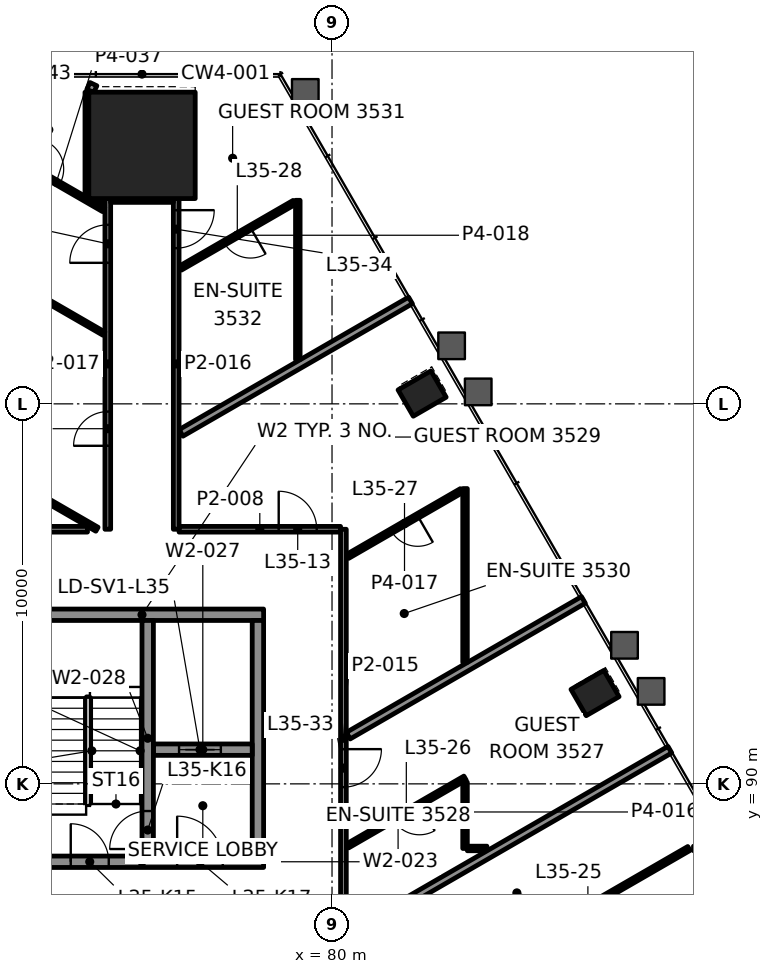
"""IFC4 building model, lengths in metres.
Left out: names, types, materials, properties, quantities, classifications, styles, units other than length and angle.
Written with IfcOpenShell. Run it as: python <this file> out.ifc"""

import sys

from ifc_helpers import new_model, si_unit, direction, frame, frame_2d, origin, origin_2d, place, context, subcontext, project, spatial, rectangle, hollow_rectangle, extrude, element, fill, save


model = new_model("IFC4")
c1 = context("Model", 3, precision=1e-05, world=origin(), true_north=direction((0.0, 1.0)))
c2 = subcontext(c1, "Body", "Model", "MODEL_VIEW")
j1 = project(units=[si_unit("LENGTHUNIT", "METRE"), si_unit("PLANEANGLEUNIT", "RADIAN")], contexts=[c1])
p1 = place(None, origin())
s1 = spatial("IfcSite", under=j1, at=p1, CompositionType="ELEMENT")
p2 = place(p1, origin())
s2 = spatial("IfcBuilding", under=s1, at=p2, CompositionType="ELEMENT")
p3 = place(p2, frame((0.0, 0.0, 155.8)))
s3 = spatial("IfcBuildingStorey", under=s2, at=p3, CompositionType="ELEMENT", Elevation=155.8)
p4 = place(p3, frame((75.0, 106.802, 0.0), z_axis=(0.0, 0.0, 1.0), x_axis=(-1.0, 0.0, 0.0)))
e1 = element("IfcColumn", 1, at=p4, inside=s3, PredefinedType="COLUMN", context=c2, shape_type="SweptSolid", body=[
    extrude(rectangle(XDim=2.8, YDim=2.8, at=origin_2d()), origin(), (0.0, 0.0, 1.0), 3.9),
])
for number, where, z_axis, x_axis in (
    (2, (86.921, 92.39, -0.0), (0.0, 0.0, 1.0), (-0.5, 0.866, 0.0)),
    (3, (82.371, 100.271, -0.0), (0.0, 0.0, 1.0), (-0.5, 0.866, 0.0)),
):
    element("IfcColumn", number, at=place(p3, frame(where, z_axis=z_axis, x_axis=x_axis)), inside=s3, PredefinedType="COLUMN", context=c2, shape_type="SweptSolid", body=[
        extrude(hollow_rectangle(XDim=0.8, YDim=1.0, WallThickness=0.05, at=origin_2d()), origin(), (0.0, 0.0, 1.0), 3.9),
    ])
p5 = place(p3, frame((71.8, 87.95, 0.0), z_axis=(0.0, 0.0, 1.0), x_axis=(1.0, 0.0, 0.0)))
e4 = element("IfcWall", 4, at=p5, inside=s3, PredefinedType="SHEAR", context=c2, shape_type="SweptSolid", body=[
    extrude(rectangle(XDim=6.4, YDim=0.3, at=frame_2d((3.2, 0.0))), origin(), (0.0, 0.0, 1.0), 3.7),
])
p6 = place(p5, frame((1.325, 0.0, 0.0)))
e5 = element("IfcOpeningElement", 5, at=p6, cuts=e4, PredefinedType="OPENING", context=c2, shape_type="SweptSolid", body=[
    extrude(rectangle(XDim=1.0, YDim=2.1, at=frame_2d((0.5, 1.05))), frame((0.0, 0.16, 0.0), z_axis=(0.0, -1.0, 0.0), x_axis=(1.0, 0.0, 0.0)), (0.0, 0.0, 1.0), 0.32),
])
p7 = place(p5, frame((4.125, 0.0, 0.0)))
e6 = element("IfcOpeningElement", 6, at=p7, cuts=e4, PredefinedType="OPENING", context=c2, shape_type="SweptSolid", body=[
    extrude(rectangle(XDim=1.2, YDim=2.1, at=frame_2d((0.6, 1.05))), frame((0.0, 0.16, 0.0), z_axis=(0.0, -1.0, 0.0), x_axis=(1.0, 0.0, 0.0)), (0.0, 0.0, 1.0), 0.32),
])
p8 = place(p3, frame((71.8, 94.45, 0.0), z_axis=(0.0, 0.0, 1.0), x_axis=(1.0, 0.0, 0.0)))
e7 = element("IfcWall", 7, at=p8, inside=s3, PredefinedType="SHEAR", context=c2, shape_type="SweptSolid", body=[
    extrude(rectangle(XDim=6.4, YDim=0.3, at=frame_2d((3.2, 0.0))), origin(), (0.0, 0.0, 1.0), 3.7),
])
p9 = place(p3, frame((78.05, 88.1, 0.0), z_axis=(0.0, 0.0, 1.0), x_axis=(0.0, 1.0, 0.0)))
e8 = element("IfcWall", 8, at=p9, inside=s3, PredefinedType="SHEAR", context=c2, shape_type="SweptSolid", body=[
    extrude(rectangle(XDim=6.2, YDim=0.3, at=frame_2d((3.1, 0.0))), origin(), (0.0, 0.0, 1.0), 3.7),
])
p10 = place(p3, frame((75.3, 90.9, 0.0), z_axis=(0.0, 0.0, 1.0), x_axis=(1.0, 0.0, 0.0)))
e9 = element("IfcWall", 9, at=p10, inside=s3, PredefinedType="SHEAR", context=c2, shape_type="SweptSolid", body=[
    extrude(rectangle(XDim=2.6, YDim=0.3, at=frame_2d((1.3, 0.0))), origin(), (0.0, 0.0, 1.0), 3.7),
])
p11 = place(p10, frame((0.675, 0.0, 0.0)))
e10 = element("IfcOpeningElement", 10, at=p11, cuts=e9, PredefinedType="OPENING", context=c2, shape_type="SweptSolid", body=[
    extrude(rectangle(XDim=1.1, YDim=2.1, at=frame_2d((0.55, 1.05))), frame((0.0, 0.16, 0.0), z_axis=(0.0, -1.0, 0.0), x_axis=(1.0, 0.0, 0.0)), (0.0, 0.0, 1.0), 0.32),
])
p12 = place(p3, frame((75.15, 88.1, 0.0), z_axis=(0.0, 0.0, 1.0), x_axis=(0.0, 1.0, 0.0)))
e11 = element("IfcWall", 11, at=p12, inside=s3, PredefinedType="SHEAR", context=c2, shape_type="SweptSolid", body=[
    extrude(rectangle(XDim=6.2, YDim=0.3, at=frame_2d((3.1, 0.0))), origin(), (0.0, 0.0, 1.0), 3.7),
])
p13 = place(p12, frame((0.185, 0.0, 0.0)))
e12 = element("IfcOpeningElement", 12, at=p13, cuts=e11, PredefinedType="OPENING", context=c2, shape_type="SweptSolid", body=[
    extrude(rectangle(XDim=1.0, YDim=2.1, at=frame_2d((0.5, 1.05))), frame((0.0, 0.16, 0.0), z_axis=(0.0, -1.0, 0.0), x_axis=(1.0, 0.0, 0.0)), (0.0, 0.0, 1.0), 0.32),
])
p14 = place(p3, frame((83.56, 88.3, 0.0), z_axis=(0.0, 0.0, 1.0), x_axis=(1.0, 0.0, 0.0)))
e13 = element("IfcWall", 13, at=p14, inside=s3, PredefinedType="PARTITIONING", context=c2, shape_type="SweptSolid", body=[
    extrude(rectangle(XDim=0.516, YDim=0.12, at=frame_2d((0.258, 0.0))), origin(), (0.0, 0.0, 1.0), 3.1),
])
p15 = place(p3, frame((69.775, 96.7, 0.0), z_axis=(0.0, 0.0, 1.0), x_axis=(1.0, 0.0, 0.0)))
e14 = element("IfcWall", 14, at=p15, inside=s3, PredefinedType="PARTITIONING", context=c2, shape_type="SweptSolid", body=[
    extrude(rectangle(XDim=3.79, YDim=0.15, at=frame_2d((1.895, 0.0))), origin(), (0.0, 0.0, 1.0), 3.1),
])
p16 = place(p3, frame((75.975, 96.7, 0.0), z_axis=(0.0, 0.0, 1.0), x_axis=(1.0, 0.0, 0.0)))
e15 = element("IfcWall", 15, at=p16, inside=s3, PredefinedType="PARTITIONING", context=c2, shape_type="SweptSolid", body=[
    extrude(rectangle(XDim=4.25, YDim=0.15, at=frame_2d((2.125, 0.0))), origin(), (0.0, 0.0, 1.0), 3.1),
])
p17 = place(p16, frame((2.622, 0.0, 0.0)))
e16 = element("IfcOpeningElement", 16, at=p17, cuts=e15, PredefinedType="OPENING", context=c2, shape_type="SweptSolid", body=[
    extrude(rectangle(XDim=1.0, YDim=2.1, at=frame_2d((0.5, 1.05))), frame((0.0, 0.085, 0.0), z_axis=(0.0, -1.0, 0.0), x_axis=(1.0, 0.0, 0.0)), (0.0, 0.0, 1.0), 0.17),
])
p18 = place(p3, frame((73.781, 105.402, 0.0), z_axis=(0.0, 0.0, 1.0), x_axis=(1.0, 0.0, 0.0)))
e17 = element("IfcWall", 17, at=p18, inside=s3, PredefinedType="PARTITIONING", context=c2, shape_type="SweptSolid", body=[
    extrude(rectangle(XDim=0.244, YDim=0.2, at=frame_2d((0.122, 0.0))), origin(), (0.0, 0.0, 1.0), 3.1),
])
p19 = place(p3, frame((89.391, 88.3, 0.0), z_axis=(0.0, 0.0, 1.0), x_axis=(-0.866037264291, -0.499979456437, 0.0)))
e18 = element("IfcWall", 18, at=p19, inside=s3, PredefinedType="PARTITIONING", context=c2, shape_type="SweptSolid", body=[
    extrude(rectangle(XDim=6.14, YDim=0.12, at=frame_2d((3.07, 0.0))), origin(), (0.0, 0.0, 1.0), 2.865),
])
p20 = place(p19, frame((2.67, 0.0, 0.0)))
e19 = element("IfcOpeningElement", 19, at=p20, cuts=e18, PredefinedType="OPENING", context=c2, shape_type="SweptSolid", body=[
    extrude(rectangle(XDim=0.8, YDim=2.1, at=frame_2d((0.4, 1.05))), frame((0.0, 0.07, 0.0), z_axis=(0.0, -1.0, 0.0), x_axis=(1.0, 0.0, 0.0)), (0.0, 0.0, 1.0), 0.14),
])
p21 = place(p3, frame((80.427, 86.014, 0.0), z_axis=(0.0, 0.0, 1.0), x_axis=(0.866026648273, 0.499997844476, 0.0)))
e20 = element("IfcWall", 20, at=p21, inside=s3, PredefinedType="PARTITIONING", context=c2, shape_type="SweptSolid", body=[
    extrude(rectangle(XDim=9.771, YDim=0.2, at=frame_2d((4.886, 0.0))), origin(), (0.0, 0.0, 1.0), 2.865),
])
p22 = place(p3, frame((83.5, 90.152, 0.0), z_axis=(0.0, 0.0, 1.0), x_axis=(-0.866028357664, -0.499994883695, 0.0)))
e21 = element("IfcWall", 21, at=p22, inside=s3, PredefinedType="PARTITIONING", context=c2, shape_type="SweptSolid", body=[
    extrude(rectangle(XDim=3.568, YDim=0.12, at=frame_2d((1.784, 0.0))), origin(), (0.0, 0.0, 1.0), 3.1),
])
p23 = place(p22, frame((1.384, 0.0, 0.0)))
e22 = element("IfcOpeningElement", 22, at=p23, cuts=e21, PredefinedType="OPENING", context=c2, shape_type="SweptSolid", body=[
    extrude(rectangle(XDim=0.8, YDim=2.1, at=frame_2d((0.4, 1.05))), frame((0.0, 0.07, 0.0), z_axis=(0.0, -1.0, 0.0), x_axis=(1.0, 0.0, 0.0)), (0.0, 0.0, 1.0), 0.14),
])
p24 = place(p3, frame((80.427, 91.268, 0.0), z_axis=(0.0, 0.0, 1.0), x_axis=(0.866030807744, 0.499990639951, 0.0)))
e23 = element("IfcWall", 23, at=p24, inside=s3, PredefinedType="PARTITIONING", context=c2, shape_type="SweptSolid", body=[
    extrude(rectangle(XDim=7.145, YDim=0.2, at=frame_2d((3.572, 0.0))), origin(), (0.0, 0.0, 1.0), 2.865),
])
p25 = place(p3, frame((83.405, 97.716, 0.0), z_axis=(0.0, 0.0, 1.0), x_axis=(-0.866028087245, -0.499995352082, 0.0)))
e24 = element("IfcWall", 24, at=p25, inside=s3, PredefinedType="PARTITIONING", context=c2, shape_type="SweptSolid", body=[
    extrude(rectangle(XDim=3.459, YDim=0.12, at=frame_2d((1.729, 0.0))), origin(), (0.0, 0.0, 1.0), 3.1),
])
p26 = place(p25, frame((1.33, 0.0, 0.0)))
e25 = element("IfcOpeningElement", 25, at=p26, cuts=e24, PredefinedType="OPENING", context=c2, shape_type="SweptSolid", body=[
    extrude(rectangle(XDim=0.8, YDim=2.1, at=frame_2d((0.4, 1.05))), frame((0.0, 0.07, 0.0), z_axis=(0.0, -1.0, 0.0), x_axis=(1.0, 0.0, 0.0)), (0.0, 0.0, 1.0), 0.14),
])
p27 = place(p3, frame((76.027, 99.236, 0.0), z_axis=(0.0, 0.0, 1.0), x_axis=(0.866038628871, 0.499977092778, 0.0)))
e26 = element("IfcWall", 26, at=p27, inside=s3, PredefinedType="PARTITIONING", context=c2, shape_type="SweptSolid", body=[
    extrude(rectangle(XDim=6.971, YDim=0.2, at=frame_2d((3.486, 0.0))), origin(), (0.0, 0.0, 1.0), 3.1),
])
p28 = place(p3, frame((79.005, 105.302, 0.0), z_axis=(0.0, 0.0, 1.0), x_axis=(-0.865997524453, -0.50004828531, 0.0)))
e27 = element("IfcWall", 27, at=p28, inside=s3, PredefinedType="PARTITIONING", context=c2, shape_type="SweptSolid", body=[
    extrude(rectangle(XDim=3.459, YDim=0.12, at=frame_2d((1.729, 0.0))), origin(), (0.0, 0.0, 1.0), 3.1),
])
p29 = place(p28, frame((1.33, 0.0, 0.0)))
e28 = element("IfcOpeningElement", 28, at=p29, cuts=e27, PredefinedType="OPENING", context=c2, shape_type="SweptSolid", body=[
    extrude(rectangle(XDim=0.8, YDim=2.1, at=frame_2d((0.4, 1.05))), frame((0.0, 0.07, 0.0), z_axis=(0.0, -1.0, 0.0), x_axis=(1.0, 0.0, 0.0)), (0.0, 0.0, 1.0), 0.14),
])
p30 = place(p3, frame((73.723, 108.413, 0.0), z_axis=(0.0, 0.0, 1.0), x_axis=(-0.427657527618, -0.903940838259, 0.0)))
e29 = element("IfcWall", 29, at=p30, inside=s3, PredefinedType="PARTITIONING", context=c2, shape_type="SweptSolid", body=[
    extrude(rectangle(XDim=0.196, YDim=0.2, at=frame_2d((0.098, 0.0))), origin(), (0.0, 0.0, 1.0), 3.1),
])
p31 = place(p3, frame((83.5, 88.3, 0.0), z_axis=(0.0, 0.0, 1.0), x_axis=(0.0, 1.0, 0.0)))
e30 = element("IfcWall", 30, at=p31, inside=s3, PredefinedType="PARTITIONING", context=c2, shape_type="SweptSolid", body=[
    extrude(rectangle(XDim=1.743, YDim=0.12, at=frame_2d((0.872, 0.0))), origin(), (0.0, 0.0, 1.0), 3.1),
])
p32 = place(p3, frame((83.5, 93.198, 0.0), z_axis=(0.0, 0.0, 1.0), x_axis=(0.0, 1.0, 0.0)))
e31 = element("IfcWall", 31, at=p32, inside=s3, PredefinedType="PARTITIONING", context=c2, shape_type="SweptSolid", body=[
    extrude(rectangle(XDim=4.573, YDim=0.12, at=frame_2d((2.287, 0.0))), origin(), (0.0, 0.0, 1.0), 3.1),
])
p33 = place(p3, frame((80.3, 96.699, 0.0), z_axis=(0.0, 0.0, 1.0), x_axis=(0.0, -1.0, 0.0)))
e32 = element("IfcWall", 32, at=p33, inside=s3, PredefinedType="PARTITIONING", context=c2, shape_type="SweptSolid", body=[
    extrude(rectangle(XDim=11.0, YDim=0.15, at=frame_2d((5.5, 0.0))), origin(), (0.0, 0.0, 1.0), 3.022),
])
p34 = place(p33, frame((5.786, 0.0, 0.0)))
e33 = element("IfcOpeningElement", 33, at=p34, cuts=e32, PredefinedType="OPENING", context=c2, shape_type="SweptSolid", body=[
    extrude(rectangle(XDim=1.0, YDim=2.1, at=frame_2d((0.5, 1.05))), frame((0.0, 0.085, 0.0), z_axis=(0.0, -1.0, 0.0), x_axis=(1.0, 0.0, 0.0)), (0.0, 0.0, 1.0), 0.17),
])
p35 = place(p3, frame((79.1, 101.165, 0.0), z_axis=(0.0, 0.0, 1.0), x_axis=(0.0, 1.0, 0.0)))
e34 = element("IfcWall", 34, at=p35, inside=s3, PredefinedType="PARTITIONING", context=c2, shape_type="SweptSolid", body=[
    extrude(rectangle(XDim=4.191, YDim=0.12, at=frame_2d((2.096, 0.0))), origin(), (0.0, 0.0, 1.0), 3.1),
])
p36 = place(p3, frame((75.9, 105.401, 0.0), z_axis=(0.0, 0.0, 1.0), x_axis=(0.0, -1.0, 0.0)))
e35 = element("IfcWall", 35, at=p36, inside=s3, PredefinedType="PARTITIONING", context=c2, shape_type="SweptSolid", body=[
    extrude(rectangle(XDim=8.701, YDim=0.15, at=frame_2d((4.351, 0.0))), origin(), (0.0, 0.0, 1.0), 3.1),
])
p37 = place(p36, frame((0.304, 0.0, 0.0)))
e36 = element("IfcOpeningElement", 36, at=p37, cuts=e35, PredefinedType="OPENING", context=c2, shape_type="SweptSolid", body=[
    extrude(rectangle(XDim=1.0, YDim=2.1, at=frame_2d((0.5, 1.05))), frame((0.0, 0.085, 0.0), z_axis=(0.0, -1.0, 0.0), x_axis=(1.0, 0.0, 0.0)), (0.0, 0.0, 1.0), 0.17),
])
p38 = place(p3, frame((74.1, 96.7, 0.0), z_axis=(0.0, 0.0, 1.0), x_axis=(0.0, 1.0, 0.0)))
e37 = element("IfcWall", 37, at=p38, inside=s3, PredefinedType="PARTITIONING", context=c2, shape_type="SweptSolid", body=[
    extrude(rectangle(XDim=8.702, YDim=0.15, at=frame_2d((4.351, 0.0))), origin(), (0.0, 0.0, 1.0), 3.1),
])
p39 = place(p38, frame((2.196, 0.0, 0.0)))
e38 = element("IfcOpeningElement", 38, at=p39, cuts=e37, PredefinedType="OPENING", context=c2, shape_type="SweptSolid", body=[
    extrude(rectangle(XDim=0.9, YDim=2.1, at=frame_2d((0.45, 1.05))), frame((0.0, 0.085, 0.0), z_axis=(0.0, -1.0, 0.0), x_axis=(1.0, 0.0, 0.0)), (0.0, 0.0, 1.0), 0.17),
])
p40 = place(p38, frame((7.011, 0.0, 0.0)))
e39 = element("IfcOpeningElement", 39, at=p40, cuts=e37, PredefinedType="OPENING", context=c2, shape_type="SweptSolid", body=[
    extrude(rectangle(XDim=1.0, YDim=2.1, at=frame_2d((0.5, 1.05))), frame((0.0, 0.085, 0.0), z_axis=(0.0, -1.0, 0.0), x_axis=(1.0, 0.0, 0.0)), (0.0, 0.0, 1.0), 0.17),
])
p41 = place(p3, frame((73.6, 105.472, 0.0), z_axis=(0.0, 0.0, 1.0), x_axis=(0.0, 1.0, 0.0)))
e40 = element("IfcWall", 40, at=p41, inside=s3, PredefinedType="PARTITIONING", context=c2, shape_type="SweptSolid", body=[
    extrude(rectangle(XDim=2.729, YDim=0.2, at=frame_2d((1.365, 0.0))), origin(), (0.0, 0.0, 1.0), 3.1),
])
p42 = place(p3, frame((71.5, 106.549, 0.0), z_axis=(0.0, 0.0, 1.0), x_axis=(0.86598763626, -0.500065409566, 0.0)))
e41 = element("IfcWall", 41, at=p42, inside=s3, PredefinedType="PARTITIONING", context=c2, shape_type="SweptSolid", body=[
    extrude(rectangle(XDim=2.875, YDim=0.12, at=frame_2d((1.438, 0.0))), origin(), (0.0, 0.0, 1.0), 3.1),
])
p43 = place(p42, frame((0.738, 0.0, 0.0)))
e42 = element("IfcOpeningElement", 42, at=p43, cuts=e41, PredefinedType="OPENING", context=c2, shape_type="SweptSolid", body=[
    extrude(rectangle(XDim=0.8, YDim=2.1, at=frame_2d((0.4, 1.05))), frame((0.0, 0.07, 0.0), z_axis=(0.0, -1.0, 0.0), x_axis=(1.0, 0.0, 0.0)), (0.0, 0.0, 1.0), 0.14),
])
p44 = place(p3, frame((73.999, 101.847, 0.0), z_axis=(0.0, 0.0, 1.0), x_axis=(-0.866024993943, 0.500000709865, 0.0)))
e43 = element("IfcWall", 43, at=p44, inside=s3, PredefinedType="PARTITIONING", context=c2, shape_type="SweptSolid", body=[
    extrude(rectangle(XDim=5.671, YDim=0.1, at=frame_2d((2.835, 0.0))), origin(), (0.0, 0.0, 1.0), 3.1),
])
p45 = place(p3, frame((73.814, 96.7, 0.0), z_axis=(0.0, 0.0, 1.0), x_axis=(-0.866025499775, 0.499999833739, 0.0)))
e44 = element("IfcWall", 44, at=p45, inside=s3, PredefinedType="PARTITIONING", context=c2, shape_type="SweptSolid", body=[
    extrude(rectangle(XDim=6.4, YDim=0.12, at=frame_2d((3.2, 0.0))), origin(), (0.0, 0.0, 1.0), 3.1),
])
p46 = place(p3, frame((74.175, 105.402, 0.0), z_axis=(0.0, 0.0, 1.0), x_axis=(1.0, 0.0, 0.0)))
e45 = element("IfcWall", 45, at=p46, inside=s3, PredefinedType="PARTITIONING", context=c2, shape_type="SweptSolid", body=[
    extrude(rectangle(XDim=1.649, YDim=0.2, at=frame_2d((0.825, 0.0))), origin(), (0.0, 0.0, 1.0), 3.097),
])
p47 = place(p17, origin())
e46 = element("IfcDoor", 46, at=p47, inside=s3, OperationType="SINGLE_SWING_RIGHT", PredefinedType="DOOR", context=c2, shape_type="SweptSolid", body=[
    extrude(rectangle(XDim=1.0, YDim=2.1, at=frame_2d((0.5, 1.05))), frame((0.0, 0.025, 0.0), z_axis=(0.0, -1.0, 0.0), x_axis=(1.0, 0.0, 0.0)), (0.0, 0.0, 1.0), 0.05),
])
fill(e16, e46)
p48 = place(p23, origin())
e47 = element("IfcDoor", 47, at=p48, inside=s3, OperationType="SINGLE_SWING_RIGHT", PredefinedType="DOOR", context=c2, shape_type="SweptSolid", body=[
    extrude(rectangle(XDim=0.8, YDim=2.1, at=frame_2d((0.4, 1.05))), frame((0.0, 0.025, 0.0), z_axis=(0.0, -1.0, 0.0), x_axis=(1.0, 0.0, 0.0)), (0.0, 0.0, 1.0), 0.05),
])
fill(e22, e47)
p49 = place(p26, origin())
e48 = element("IfcDoor", 48, at=p49, inside=s3, OperationType="SINGLE_SWING_RIGHT", PredefinedType="DOOR", context=c2, shape_type="SweptSolid", body=[
    extrude(rectangle(XDim=0.8, YDim=2.1, at=frame_2d((0.4, 1.05))), frame((0.0, 0.025, 0.0), z_axis=(0.0, -1.0, 0.0), x_axis=(1.0, 0.0, 0.0)), (0.0, 0.0, 1.0), 0.05),
])
fill(e25, e48)
p50 = place(p29, origin())
e49 = element("IfcDoor", 49, at=p50, inside=s3, OperationType="SINGLE_SWING_RIGHT", PredefinedType="DOOR", context=c2, shape_type="SweptSolid", body=[
    extrude(rectangle(XDim=0.8, YDim=2.1, at=frame_2d((0.4, 1.05))), frame((0.0, 0.025, 0.0), z_axis=(0.0, -1.0, 0.0), x_axis=(1.0, 0.0, 0.0)), (0.0, 0.0, 1.0), 0.05),
])
fill(e28, e49)
p51 = place(p34, origin())
e50 = element("IfcDoor", 50, at=p51, inside=s3, OperationType="SINGLE_SWING_LEFT", PredefinedType="DOOR", context=c2, shape_type="SweptSolid", body=[
    extrude(rectangle(XDim=1.0, YDim=2.1, at=frame_2d((0.5, 1.05))), frame((0.0, 0.025, 0.0), z_axis=(0.0, -1.0, 0.0), x_axis=(1.0, 0.0, 0.0)), (0.0, 0.0, 1.0), 0.05),
])
fill(e33, e50)
p52 = place(p37, origin())
e51 = element("IfcDoor", 51, at=p52, inside=s3, OperationType="SINGLE_SWING_LEFT", PredefinedType="DOOR", context=c2, shape_type="SweptSolid", body=[
    extrude(rectangle(XDim=1.0, YDim=2.1, at=frame_2d((0.5, 1.05))), frame((0.0, 0.025, 0.0), z_axis=(0.0, -1.0, 0.0), x_axis=(1.0, 0.0, 0.0)), (0.0, 0.0, 1.0), 0.05),
])
fill(e36, e51)
p53 = place(p39, origin())
e52 = element("IfcDoor", 52, at=p53, inside=s3, OperationType="SINGLE_SWING_RIGHT", PredefinedType="DOOR", context=c2, shape_type="SweptSolid", body=[
    extrude(rectangle(XDim=0.9, YDim=2.1, at=frame_2d((0.45, 1.05))), frame((0.0, 0.025, 0.0), z_axis=(0.0, -1.0, 0.0), x_axis=(1.0, 0.0, 0.0)), (0.0, 0.0, 1.0), 0.05),
])
fill(e38, e52)
p54 = place(p40, origin())
e53 = element("IfcDoor", 53, at=p54, inside=s3, OperationType="SINGLE_SWING_RIGHT", PredefinedType="DOOR", context=c2, shape_type="SweptSolid", body=[
    extrude(rectangle(XDim=1.0, YDim=2.1, at=frame_2d((0.5, 1.05))), frame((0.0, 0.025, 0.0), z_axis=(0.0, -1.0, 0.0), x_axis=(1.0, 0.0, 0.0)), (0.0, 0.0, 1.0), 0.05),
])
fill(e39, e53)
p55 = place(p43, origin())
e54 = element("IfcDoor", 54, at=p55, inside=s3, OperationType="SINGLE_SWING_RIGHT", PredefinedType="DOOR", context=c2, shape_type="SweptSolid", body=[
    extrude(rectangle(XDim=0.8, YDim=2.1, at=frame_2d((0.4, 1.05))), frame((0.0, 0.025, 0.0), z_axis=(0.0, -1.0, 0.0), x_axis=(1.0, 0.0, 0.0)), (0.0, 0.0, 1.0), 0.05),
])
fill(e42, e54)
p56 = place(p3, origin())
p57 = place(p56, frame((86.219, 95.556, 0.15), z_axis=(0.0, 0.0, 1.0), x_axis=(-0.5, 0.866025, 0.0)))
p58 = place(p57, origin())
e55 = element("IfcWindow", 55, at=p58, inside=s3, PartitioningType="SINGLE_PANEL", PredefinedType="WINDOW", context=c2, shape_type="SweptSolid", body=[
    extrude(rectangle(XDim=2.958, YDim=3.55, at=frame_2d((1.479, 1.775))), frame((0.0, 0.03, 0.0), z_axis=(0.0, -1.0, 0.0), x_axis=(1.0, 0.0, 0.0)), (0.0, 0.0, 1.0), 0.06),
])
p59 = place(p11, origin())
e56 = element("IfcDoor", 56, at=p59, inside=s3, OperationType="DOUBLE_DOOR_SLIDING", PredefinedType="DOOR", context=c2, shape_type="SweptSolid", body=[
    extrude(rectangle(XDim=1.1, YDim=2.1, at=frame_2d((0.55, 1.05))), frame((0.0, 0.025, 0.0), z_axis=(0.0, -1.0, 0.0), x_axis=(1.0, 0.0, 0.0)), (0.0, 0.0, 1.0), 0.05),
])
fill(e10, e56)
p60 = place(p6, origin())
e57 = element("IfcDoor", 57, at=p60, inside=s3, OperationType="SINGLE_SWING_RIGHT", PredefinedType="DOOR", context=c2, shape_type="SweptSolid", body=[
    extrude(rectangle(XDim=1.0, YDim=2.1, at=frame_2d((0.5, 1.05))), frame((0.0, 0.025, 0.0), z_axis=(0.0, -1.0, 0.0), x_axis=(1.0, 0.0, 0.0)), (0.0, 0.0, 1.0), 0.05),
])
fill(e5, e57)
p61 = place(p13, origin())
e58 = element("IfcDoor", 58, at=p61, inside=s3, OperationType="SINGLE_SWING_LEFT", PredefinedType="DOOR", context=c2, shape_type="SweptSolid", body=[
    extrude(rectangle(XDim=1.0, YDim=2.1, at=frame_2d((0.5, 1.05))), frame((0.0, 0.025, 0.0), z_axis=(0.0, -1.0, 0.0), x_axis=(1.0, 0.0, 0.0)), (0.0, 0.0, 1.0), 0.05),
])
fill(e12, e58)
p62 = place(p7, origin())
e59 = element("IfcDoor", 59, at=p62, inside=s3, OperationType="SINGLE_SWING_RIGHT", PredefinedType="DOOR", context=c2, shape_type="SweptSolid", body=[
    extrude(rectangle(XDim=1.2, YDim=2.1, at=frame_2d((0.6, 1.05))), frame((0.0, 0.025, 0.0), z_axis=(0.0, -1.0, 0.0), x_axis=(1.0, 0.0, 0.0)), (0.0, 0.0, 1.0), 0.05),
])
fill(e6, e59)
save(model, sys.argv[1])
